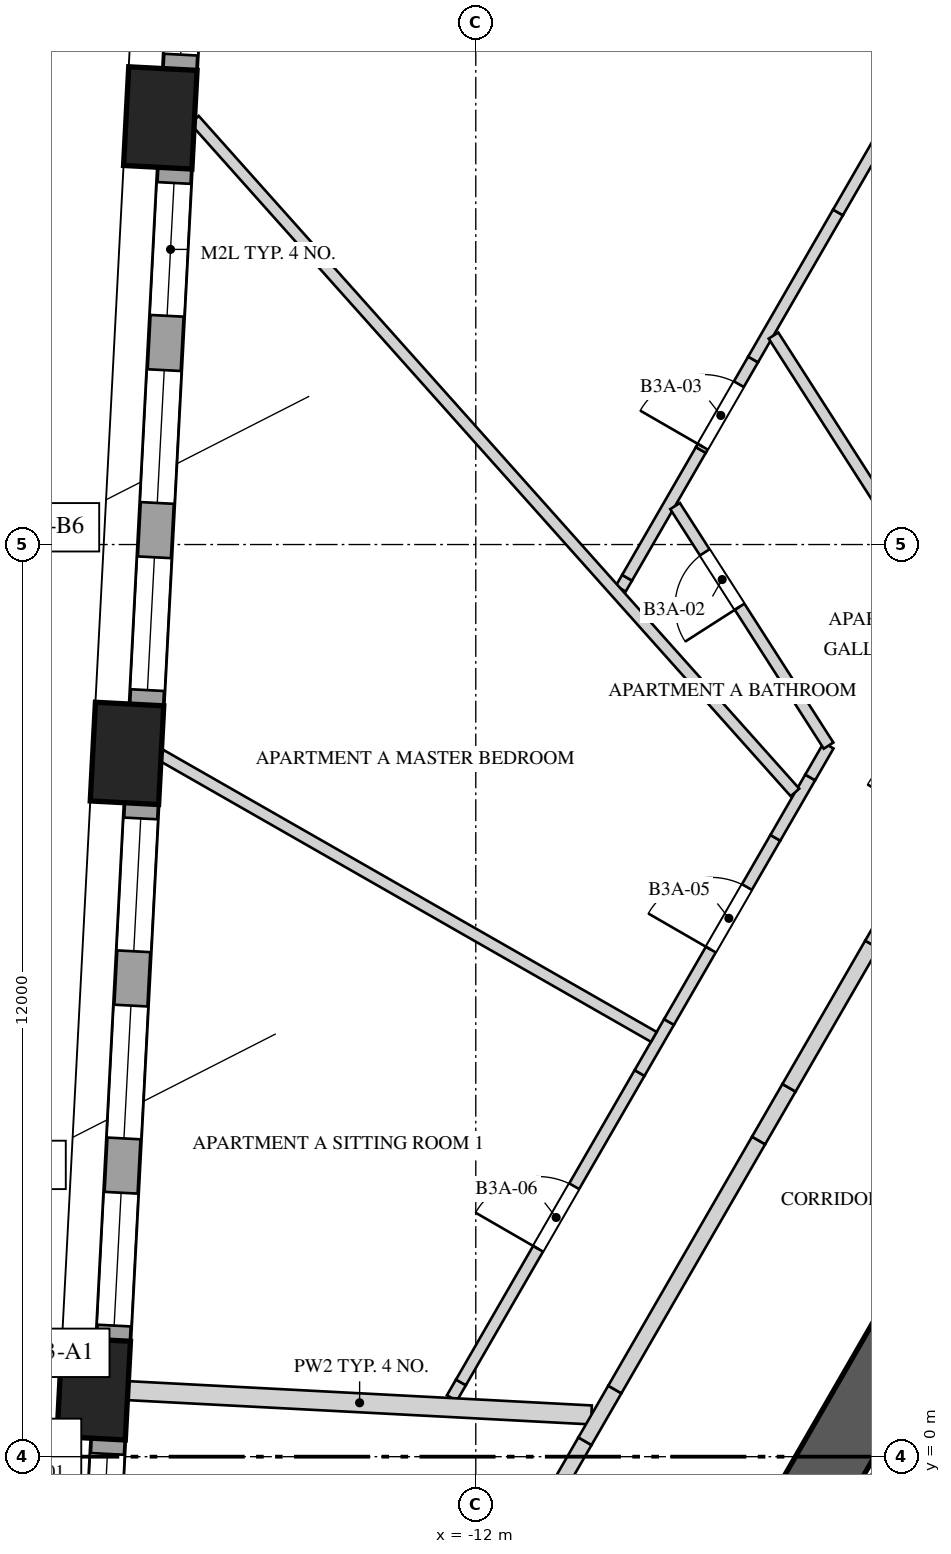
"""IFC4 building model, lengths in metres.
Left out: names, types, materials, properties, quantities, classifications, styles, units other than length and angle.
Written with IfcOpenShell. Run it as: python <this file> out.ifc"""

import sys

from ifc_helpers import new_model, si_unit, direction, frame, frame_2d, origin, origin_2d, place, context, subcontext, project, spatial, polyline, rectangle, outline, extrude, element, fill, save


model = new_model("IFC4")
c1 = context("Model", 3, precision=1e-05, world=origin(), true_north=direction((0.0, 1.0)))
c2 = subcontext(c1, "Body", "Model", "MODEL_VIEW")
j1 = project(units=[si_unit("LENGTHUNIT", "METRE"), si_unit("PLANEANGLEUNIT", "RADIAN")], contexts=[c1])
p1 = place(None, origin())
s1 = spatial("IfcSite", under=j1, at=p1, CompositionType="ELEMENT")
p2 = place(p1, origin())
s2 = spatial("IfcBuilding", under=s1, at=p2, CompositionType="ELEMENT")
p3 = place(p2, frame((0.0, 0.0, 133.6)))
s3 = spatial("IfcBuildingStorey", under=s2, at=p3, CompositionType="ELEMENT", Elevation=133.6)
p4 = place(p3, frame((-1.184, 10.55, 0.0), z_axis=(0.0, 0.0, 1.0), x_axis=(-0.500004814304, -0.866022624227, 0.0)))
e1 = element("IfcWall", 1, at=p4, inside=s3, PredefinedType="SHEAR", context=c2, shape_type="SweptSolid", body=[
    extrude(rectangle(XDim=17.09, YDim=0.9, at=frame_2d((8.545, 0.0))), origin(), (0.0, 0.0, 1.0), 4.0),
])
p5 = place(p4, frame((6.75, 0.0, 0.0)))
e2 = element("IfcOpeningElement", 2, at=p5, cuts=e1, PredefinedType="OPENING", context=c2, shape_type="SweptSolid", body=[
    extrude(rectangle(XDim=1.0, YDim=2.4, at=frame_2d((0.5, 1.2))), frame((0.0, 0.46, 0.0), z_axis=(0.0, -1.0, 0.0), x_axis=(1.0, 0.0, 0.0)), (0.0, 0.0, 1.0), 0.92),
])
p6 = place(p4, frame((14.678, 0.0, 0.0)))
e3 = element("IfcOpeningElement", 3, at=p6, cuts=e1, PredefinedType="OPENING", context=c2, shape_type="SweptSolid", body=[
    extrude(rectangle(XDim=0.8, YDim=2.1, at=frame_2d((0.4, 1.05))), frame((0.0, 0.46, 0.0), z_axis=(0.0, -1.0, 0.0), x_axis=(1.0, 0.0, 0.0)), (0.0, 0.0, 1.0), 0.92),
])
for number, where, z_axis, x_axis in (
    (4, (-16.15, 17.613, 0.0), (0.0, 0.0, 1.0), (-0.052, -0.999, 0.0)),
    (5, (-16.588, 9.252, 0.0), (0.0, 0.0, 1.0), (-0.052, -0.999, 0.0)),
    (6, (-17.027, 0.892, 0.0), (0.0, 0.0, 1.0), (-0.052, -0.999, 0.0)),
):
    element("IfcColumn", number, at=place(p3, frame(where, z_axis=z_axis, x_axis=x_axis)), inside=s3, PredefinedType="COLUMN", context=c2, shape_type="SweptSolid", body=[
        extrude(rectangle(XDim=1.3, YDim=0.9, at=origin_2d()), origin(), (0.0, 0.0, 1.0), 4.0),
    ])
p7 = place(p3, frame((-15.556, 24.663, 0.0), z_axis=(0.0, 0.0, 1.0), x_axis=(-0.052313391961, -0.998630717043, 0.0)))
e7 = element("IfcWall", 7, at=p7, inside=s3, PredefinedType="SOLIDWALL", context=c2, shape_type="SweptSolid", body=[
    extrude(rectangle(XDim=6.422, YDim=0.45, at=frame_2d((3.211, 0.0))), origin(), (0.0, 0.0, 1.0), 3.3),
])
p8 = place(p7, frame((0.195, 0.0, 0.5)))
e8 = element("IfcOpeningElement", 8, at=p8, cuts=e7, PredefinedType="OPENING", context=c2, shape_type="SweptSolid", body=[
    extrude(rectangle(XDim=1.1, YDim=2.0, at=frame_2d((0.55, 1.0))), frame((0.0, 0.235, 0.0), z_axis=(0.0, -1.0, 0.0), x_axis=(1.0, 0.0, 0.0)), (0.0, 0.0, 1.0), 0.47),
])
p9 = place(p7, frame((2.011, 0.0, 0.5)))
e9 = element("IfcOpeningElement", 9, at=p9, cuts=e7, PredefinedType="OPENING", context=c2, shape_type="SweptSolid", body=[
    extrude(rectangle(XDim=1.75, YDim=2.65, at=frame_2d((0.875, 1.325))), frame((0.0, 0.235, 0.0), z_axis=(0.0, -1.0, 0.0), x_axis=(1.0, 0.0, 0.0)), (0.0, 0.0, 1.0), 0.47),
])
p10 = place(p7, frame((4.476, 0.0, 0.5)))
e10 = element("IfcOpeningElement", 10, at=p10, cuts=e7, PredefinedType="OPENING", context=c2, shape_type="SweptSolid", body=[
    extrude(rectangle(XDim=1.75, YDim=2.65, at=frame_2d((0.875, 1.325))), frame((0.0, 0.235, 0.0), z_axis=(0.0, -1.0, 0.0), x_axis=(1.0, 0.0, 0.0)), (0.0, 0.0, 1.0), 0.47),
])
p11 = place(p3, frame((-15.96, 16.952, 0.0), z_axis=(0.0, 0.0, 1.0), x_axis=(-0.052337766399, -0.998629439887, 0.0)))
e11 = element("IfcWall", 11, at=p11, inside=s3, PredefinedType="SOLIDWALL", context=c2, shape_type="SweptSolid", body=[
    extrude(rectangle(XDim=7.072, YDim=0.45, at=frame_2d((3.536, 0.0))), origin(), (0.0, 0.0, 1.0), 3.3),
])
p12 = place(p11, frame((0.195, 0.0, 0.5)))
e12 = element("IfcOpeningElement", 12, at=p12, cuts=e11, PredefinedType="OPENING", context=c2, shape_type="SweptSolid", body=[
    extrude(rectangle(XDim=1.75, YDim=2.0, at=frame_2d((0.875, 1.0))), frame((0.0, 0.235, 0.0), z_axis=(0.0, -1.0, 0.0), x_axis=(1.0, 0.0, 0.0)), (0.0, 0.0, 1.0), 0.47),
])
p13 = place(p11, frame((2.661, 0.0, 0.5)))
e13 = element("IfcOpeningElement", 13, at=p13, cuts=e11, PredefinedType="OPENING", context=c2, shape_type="SweptSolid", body=[
    extrude(rectangle(XDim=1.75, YDim=2.65, at=frame_2d((0.875, 1.325))), frame((0.0, 0.235, 0.0), z_axis=(0.0, -1.0, 0.0), x_axis=(1.0, 0.0, 0.0)), (0.0, 0.0, 1.0), 0.47),
])
p14 = place(p11, frame((5.126, 0.0, 0.5)))
e14 = element("IfcOpeningElement", 14, at=p14, cuts=e11, PredefinedType="OPENING", context=c2, shape_type="SweptSolid", body=[
    extrude(rectangle(XDim=1.75, YDim=2.65, at=frame_2d((0.875, 1.325))), frame((0.0, 0.235, 0.0), z_axis=(0.0, -1.0, 0.0), x_axis=(1.0, 0.0, 0.0)), (0.0, 0.0, 1.0), 0.47),
])
p15 = place(p3, frame((-16.398, 8.592, 0.0), z_axis=(0.0, 0.0, 1.0), x_axis=(-0.052337766399, -0.998629439887, 0.0)))
e15 = element("IfcWall", 15, at=p15, inside=s3, PredefinedType="SOLIDWALL", context=c2, shape_type="SweptSolid", body=[
    extrude(rectangle(XDim=7.072, YDim=0.45, at=frame_2d((3.536, 0.0))), origin(), (0.0, 0.0, 1.0), 3.3),
])
p16 = place(p15, frame((0.195, 0.0, 0.5)))
e16 = element("IfcOpeningElement", 16, at=p16, cuts=e15, PredefinedType="OPENING", context=c2, shape_type="SweptSolid", body=[
    extrude(rectangle(XDim=1.75, YDim=2.65, at=frame_2d((0.875, 1.325))), frame((0.0, 0.235, 0.0), z_axis=(0.0, -1.0, 0.0), x_axis=(1.0, 0.0, 0.0)), (0.0, 0.0, 1.0), 0.47),
])
p17 = place(p15, frame((2.661, 0.0, 0.5)))
e17 = element("IfcOpeningElement", 17, at=p17, cuts=e15, PredefinedType="OPENING", context=c2, shape_type="SweptSolid", body=[
    extrude(rectangle(XDim=1.75, YDim=2.65, at=frame_2d((0.875, 1.325))), frame((0.0, 0.235, 0.0), z_axis=(0.0, -1.0, 0.0), x_axis=(1.0, 0.0, 0.0)), (0.0, 0.0, 1.0), 0.47),
])
p18 = place(p15, frame((5.126, 0.0, 0.5)))
e18 = element("IfcOpeningElement", 18, at=p18, cuts=e15, PredefinedType="OPENING", context=c2, shape_type="SweptSolid", body=[
    extrude(rectangle(XDim=1.75, YDim=2.65, at=frame_2d((0.875, 1.325))), frame((0.0, 0.235, 0.0), z_axis=(0.0, -1.0, 0.0), x_axis=(1.0, 0.0, 0.0)), (0.0, 0.0, 1.0), 0.47),
])
p19 = place(p3, frame((-16.836, 0.231, 0.0), z_axis=(0.0, 0.0, 1.0), x_axis=(-0.05234931875, -0.998628834366, 0.0)))
e19 = element("IfcWall", 19, at=p19, inside=s3, PredefinedType="SOLIDWALL", context=c2, shape_type="SweptSolid", body=[
    extrude(rectangle(XDim=2.141, YDim=0.45, at=frame_2d((1.07, 0.0))), origin(), (0.0, 0.0, 1.0), 3.3),
])
p20 = place(p19, frame((0.195, 0.0, 0.5)))
e20 = element("IfcOpeningElement", 20, at=p20, cuts=e19, PredefinedType="OPENING", context=c2, shape_type="SweptSolid", body=[
    extrude(rectangle(XDim=1.75, YDim=2.65, at=frame_2d((0.875, 1.325))), frame((0.0, 0.235, 0.0), z_axis=(0.0, -1.0, 0.0), x_axis=(1.0, 0.0, 0.0)), (0.0, 0.0, 1.0), 0.47),
])
p21 = place(p3, frame((-4.451, 3.39, 0.0), z_axis=(0.0, 0.0, 1.0), x_axis=(-0.499996545922, -0.866027397988, 0.0)))
e21 = element("IfcWall", 21, at=p21, inside=s3, PredefinedType="SOLIDWALL", context=c2, shape_type="SweptSolid", body=[
    extrude(rectangle(XDim=5.5, YDim=0.4, at=frame_2d((2.75, 0.0))), origin(), (0.0, 0.0, 1.0), 3.65),
])
p22 = place(p3, frame((-12.314, 0.771, 0.0), z_axis=(0.0, 0.0, 1.0), x_axis=(0.4996633593, 0.866219676164, 0.0)))
e22 = element("IfcWall", 22, at=p22, inside=s3, PredefinedType="PARTITIONING", context=c2, shape_type="SweptSolid", body=[
    extrude(rectangle(XDim=0.239, YDim=0.15, at=frame_2d((0.119, 0.0))), origin(), (0.0, 0.0, 1.0), 2.95),
])
p23 = place(p3, frame((-12.195, 0.977, 0.0), z_axis=(0.0, 0.0, 1.0), x_axis=(0.499993726502, 0.86602902576, 0.0)))
e23 = element("IfcWall", 23, at=p23, inside=s3, PredefinedType="PARTITIONING", context=c2, shape_type="SweptSolid", body=[
    extrude(rectangle(XDim=4.7, YDim=0.15, at=frame_2d((2.35, 0.0))), origin(), (0.0, 0.0, 1.0), 3.65),
])
p24 = place(p23, frame((2.03, 0.0, 0.0)))
e24 = element("IfcOpeningElement", 24, at=p24, cuts=e23, PredefinedType="OPENING", context=c2, shape_type="SweptSolid", body=[
    extrude(rectangle(XDim=0.95, YDim=2.4, at=frame_2d((0.475, 1.2))), frame((0.0, 0.085, 0.0), z_axis=(0.0, -1.0, 0.0), x_axis=(1.0, 0.0, 0.0)), (0.0, 0.0, 1.0), 0.17),
])
p25 = place(p3, frame((-9.845, 5.048, 0.0), z_axis=(0.0, 0.0, 1.0), x_axis=(0.499967891604, 0.866043940782, 0.0)))
e25 = element("IfcWall", 25, at=p25, inside=s3, PredefinedType="PARTITIONING", context=c2, shape_type="SweptSolid", body=[
    extrude(rectangle(XDim=0.775, YDim=0.15, at=frame_2d((0.387, 0.0))), origin(), (0.0, 0.0, 1.0), 2.75),
])
p26 = place(p3, frame((-9.458, 5.719, 0.0), z_axis=(0.0, 0.0, 1.0), x_axis=(0.499996941814, 0.866027169422, 0.0)))
e26 = element("IfcWall", 26, at=p26, inside=s3, PredefinedType="PARTITIONING", context=c2, shape_type="SweptSolid", body=[
    extrude(rectangle(XDim=2.797, YDim=0.15, at=frame_2d((1.399, 0.0))), origin(), (0.0, 0.0, 1.0), 3.65),
])
p27 = place(p26, frame((1.1, 0.0, 0.0)))
e27 = element("IfcOpeningElement", 27, at=p27, cuts=e26, PredefinedType="OPENING", context=c2, shape_type="SweptSolid", body=[
    extrude(rectangle(XDim=0.95, YDim=2.4, at=frame_2d((0.475, 1.2))), frame((0.0, 0.085, 0.0), z_axis=(0.0, -1.0, 0.0), x_axis=(1.0, 0.0, 0.0)), (0.0, 0.0, 1.0), 0.17),
])
p28 = place(p3, frame((-8.059, 8.141, 0.0), z_axis=(0.0, 0.0, 1.0), x_axis=(0.500060322201, 0.865990573944, 0.0)))
e28 = element("IfcWall", 28, at=p28, inside=s3, PredefinedType="PARTITIONING", context=c2, shape_type="SweptSolid", body=[
    extrude(rectangle(XDim=0.917, YDim=0.15, at=frame_2d((0.459, 0.0))), origin(), (0.0, 0.0, 1.0), 2.55),
])
p29 = place(p3, frame((-7.6, 8.936, 0.0), z_axis=(0.0, 0.0, 1.0), x_axis=(0.499941024108, 0.866059450854, 0.0)))
e29 = element("IfcWall", 29, at=p29, inside=s3, PredefinedType="PARTITIONING", context=c2, shape_type="SweptSolid", body=[
    extrude(rectangle(XDim=0.483, YDim=0.15, at=frame_2d((0.242, 0.0))), origin(), (0.0, 0.0, 1.0), 3.65),
])
p30 = place(p3, frame((-10.479, 0.549, 0.0), z_axis=(0.0, 0.0, 1.0), x_axis=(-0.998629511984, 0.052336390727, 0.0)))
e30 = element("IfcWall", 30, at=p30, inside=s3, PredefinedType="SOLIDWALL", context=c2, shape_type="SweptSolid", body=[
    extrude(rectangle(XDim=6.106, YDim=0.25, at=frame_2d((3.053, 0.0))), origin(), (0.0, 0.0, 1.0), 2.95),
])
p31 = place(p3, frame((-10.093, 11.419, 0.0), z_axis=(0.0, 0.0, 1.0), x_axis=(0.500399834964, 0.865794435861, 0.0)))
e31 = element("IfcWall", 31, at=p31, inside=s3, PredefinedType="PARTITIONING", context=c2, shape_type="SweptSolid", body=[
    extrude(rectangle(XDim=0.166, YDim=0.15, at=frame_2d((0.083, 0.0))), origin(), (0.0, 0.0, 1.0), 2.55),
])
p32 = place(p3, frame((-10.01, 11.563, 0.0), z_axis=(0.0, 0.0, 1.0), x_axis=(0.499994660107, 0.866028486751, 0.0)))
e32 = element("IfcWall", 32, at=p32, inside=s3, PredefinedType="PARTITIONING", context=c2, shape_type="SweptSolid", body=[
    extrude(rectangle(XDim=1.941, YDim=0.15, at=frame_2d((0.97, 0.0))), origin(), (0.0, 0.0, 1.0), 3.65),
])
p33 = place(p3, frame((-9.039, 13.244, 0.0), z_axis=(0.0, 0.0, 1.0), x_axis=(0.499978698016, 0.866037702141, 0.0)))
e33 = element("IfcWall", 33, at=p33, inside=s3, PredefinedType="PARTITIONING", context=c2, shape_type="SweptSolid", body=[
    extrude(outline(polyline([(0.0, 0.0), (1.375, 0.0), (1.375, 2.55), (0.38, 2.55), (0.38, 3.65), (0.0, 3.65), (0.0, 0.0)])), frame((0.0, 0.075, 0.0), z_axis=(0.0, -1.0, 0.0), x_axis=(1.0, 0.0, 0.0)), (0.0, 0.0, 1.0), 0.15),
])
p34 = place(p33, frame((0.05, 0.0, 0.0)))
e34 = element("IfcOpeningElement", 34, at=p34, cuts=e33, PredefinedType="OPENING", context=c2, shape_type="SweptSolid", body=[
    extrude(rectangle(XDim=0.95, YDim=2.4, at=frame_2d((0.475, 1.2))), frame((0.0, 0.085, 0.0), z_axis=(0.0, -1.0, 0.0), x_axis=(1.0, 0.0, 0.0)), (0.0, 0.0, 1.0), 0.17),
])
p35 = place(p3, frame((-8.352, 14.434, 0.0), z_axis=(0.0, 0.0, 1.0), x_axis=(0.500040905051, 0.866001785954, 0.0)))
e35 = element("IfcWall", 35, at=p35, inside=s3, PredefinedType="PARTITIONING", context=c2, shape_type="SweptSolid", body=[
    extrude(rectangle(XDim=2.234, YDim=0.15, at=frame_2d((1.117, 0.0))), origin(), (0.0, 0.0, 1.0), 3.65),
])
p36 = place(p3, frame((-7.235, 16.369, 0.0), z_axis=(0.0, 0.0, 1.0), x_axis=(0.499850094852, 0.866111934265, 0.0)))
e36 = element("IfcWall", 36, at=p36, inside=s3, PredefinedType="PARTITIONING", context=c2, shape_type="SweptSolid", body=[
    extrude(rectangle(XDim=1.104, YDim=0.15, at=frame_2d((0.552, 0.0))), origin(), (0.0, 0.0, 1.0), 2.55),
])
p37 = place(p3, frame((-9.658, 5.522, 0.0), z_axis=(0.0, 0.0, 1.0), x_axis=(-0.868078092768, 0.496427663267, 0.0)))
e37 = element("IfcWall", 37, at=p37, inside=s3, PredefinedType="PARTITIONING", context=c2, shape_type="SweptSolid", body=[
    extrude(rectangle(XDim=7.467, YDim=0.15, at=frame_2d((3.733, 0.0))), origin(), (0.0, 0.0, 1.0), 2.75),
])
p38 = place(p3, frame((-8.083, 14.749, 0.0), z_axis=(0.0, 0.0, 1.0), x_axis=(0.539468172068, -0.842005992452, 0.0)))
e38 = element("IfcWall", 38, at=p38, inside=s3, PredefinedType="PARTITIONING", context=c2, shape_type="SweptSolid", body=[
    extrude(rectangle(XDim=3.744, YDim=0.15, at=frame_2d((1.872, 0.0))), origin(), (0.0, 0.0, 1.0), 3.65),
])
p39 = place(p3, frame((-7.801, 8.739, 0.0), z_axis=(0.0, 0.0, 1.0), x_axis=(-0.665934790779, 0.746009955986, 0.0)))
e39 = element("IfcWall", 39, at=p39, inside=s3, PredefinedType="PARTITIONING", context=c2, shape_type="SweptSolid", body=[
    extrude(rectangle(XDim=11.863, YDim=0.15, at=frame_2d((5.932, 0.0))), origin(), (0.0, 0.0, 1.0), 2.55),
])
p40 = place(p3, frame((-7.359, 9.354, 0.0), z_axis=(0.0, 0.0, 1.0), x_axis=(-0.539468172068, 0.842005992452, 0.0)))
e40 = element("IfcWall", 40, at=p40, inside=s3, PredefinedType="PARTITIONING", context=c2, shape_type="SweptSolid", body=[
    extrude(rectangle(XDim=3.744, YDim=0.15, at=frame_2d((1.872, 0.0))), origin(), (0.0, 0.0, 1.0), 3.65),
])
p41 = place(p40, frame((2.17, 0.0, 0.0)))
e41 = element("IfcOpeningElement", 41, at=p41, cuts=e40, PredefinedType="OPENING", context=c2, shape_type="SweptSolid", body=[
    extrude(rectangle(XDim=0.85, YDim=2.4, at=frame_2d((0.425, 1.2))), frame((0.0, 0.085, 0.0), z_axis=(0.0, -1.0, 0.0), x_axis=(1.0, 0.0, 0.0)), (0.0, 0.0, 1.0), 0.17),
])
p42 = place(p3, frame((-13.135, -4.25, 0.0), z_axis=(0.0, 0.0, 1.0), x_axis=(0.50000466804, 0.866022708674, 0.0)))
e42 = element("IfcWall", 42, at=p42, inside=s3, PredefinedType="SOLIDWALL", context=c2, shape_type="SweptSolid", body=[
    extrude(rectangle(XDim=5.142, YDim=0.2, at=frame_2d((2.571, 0.0))), origin(), (0.0, 0.0, 1.0), 3.65),
])
p43 = place(p3, frame((-10.564, 0.203, 0.0), z_axis=(0.0, 0.0, 1.0), x_axis=(0.499982474044, 0.866035522163, 0.0)))
e43 = element("IfcWall", 43, at=p43, inside=s3, PredefinedType="SOLIDWALL", context=c2, shape_type="SweptSolid", body=[
    extrude(rectangle(XDim=0.786, YDim=0.2, at=frame_2d((0.393, 0.0))), origin(), (0.0, 0.0, 1.0), 2.95),
])
p44 = place(p3, frame((-10.171, 0.884, 0.0), z_axis=(0.0, 0.0, 1.0), x_axis=(0.499998034377, 0.866026538634, 0.0)))
e44 = element("IfcWall", 44, at=p44, inside=s3, PredefinedType="SOLIDWALL", context=c2, shape_type="SweptSolid", body=[
    extrude(rectangle(XDim=3.783, YDim=0.2, at=frame_2d((1.892, 0.0))), origin(), (0.0, 0.0, 1.0), 3.65),
])
p45 = place(p3, frame((-8.279, 4.16, 0.0), z_axis=(0.0, 0.0, 1.0), x_axis=(0.500109828528, 0.865961984968, 0.0)))
e45 = element("IfcWall", 45, at=p45, inside=s3, PredefinedType="SOLIDWALL", context=c2, shape_type="SweptSolid", body=[
    extrude(rectangle(XDim=0.8, YDim=0.2, at=frame_2d((0.4, 0.0))), origin(), (0.0, 0.0, 1.0), 2.75),
])
p46 = place(p3, frame((-7.879, 4.853, 0.0), z_axis=(0.0, 0.0, 1.0), x_axis=(0.499948868167, 0.866054922749, 0.0)))
e46 = element("IfcWall", 46, at=p46, inside=s3, PredefinedType="SOLIDWALL", context=c2, shape_type="SweptSolid", body=[
    extrude(rectangle(XDim=2.178, YDim=0.2, at=frame_2d((1.089, 0.0))), origin(), (0.0, 0.0, 1.0), 3.65),
])
p47 = place(p3, frame((-6.79, 6.739, 0.0), z_axis=(0.0, 0.0, 1.0), x_axis=(0.500118100521, 0.865957207679, 0.0)))
e47 = element("IfcWall", 47, at=p47, inside=s3, PredefinedType="SOLIDWALL", context=c2, shape_type="SweptSolid", body=[
    extrude(rectangle(XDim=0.944, YDim=0.2, at=frame_2d((0.472, 0.0))), origin(), (0.0, 0.0, 1.0), 2.55),
])
p48 = place(p10, origin())
e48 = element("IfcWindow", 48, at=p48, inside=s3, PartitioningType="SINGLE_PANEL", PredefinedType="WINDOW", context=c2, shape_type="SweptSolid", body=[
    extrude(rectangle(XDim=1.75, YDim=2.65, at=frame_2d((0.875, 1.325))), frame((0.0, 0.03, 0.0), z_axis=(0.0, -1.0, 0.0), x_axis=(1.0, 0.0, 0.0)), (0.0, 0.0, 1.0), 0.06),
])
fill(e10, e48)
p49 = place(p12, origin())
e49 = element("IfcWindow", 49, at=p49, inside=s3, PartitioningType="SINGLE_PANEL", PredefinedType="WINDOW", context=c2, shape_type="SweptSolid", body=[
    extrude(rectangle(XDim=1.75, YDim=2.0, at=frame_2d((0.875, 1.0))), frame((0.0, 0.03, 0.0), z_axis=(0.0, -1.0, 0.0), x_axis=(1.0, 0.0, 0.0)), (0.0, 0.0, 1.0), 0.06),
])
fill(e12, e49)
p50 = place(p13, origin())
e50 = element("IfcWindow", 50, at=p50, inside=s3, PartitioningType="SINGLE_PANEL", PredefinedType="WINDOW", context=c2, shape_type="SweptSolid", body=[
    extrude(rectangle(XDim=1.75, YDim=2.65, at=frame_2d((0.875, 1.325))), frame((0.0, 0.03, 0.0), z_axis=(0.0, -1.0, 0.0), x_axis=(1.0, 0.0, 0.0)), (0.0, 0.0, 1.0), 0.06),
])
fill(e13, e50)
p51 = place(p14, origin())
e51 = element("IfcWindow", 51, at=p51, inside=s3, PartitioningType="SINGLE_PANEL", PredefinedType="WINDOW", context=c2, shape_type="SweptSolid", body=[
    extrude(rectangle(XDim=1.75, YDim=2.65, at=frame_2d((0.875, 1.325))), frame((0.0, 0.03, 0.0), z_axis=(0.0, -1.0, 0.0), x_axis=(1.0, 0.0, 0.0)), (0.0, 0.0, 1.0), 0.06),
])
fill(e14, e51)
p52 = place(p16, origin())
e52 = element("IfcWindow", 52, at=p52, inside=s3, PartitioningType="SINGLE_PANEL", PredefinedType="WINDOW", context=c2, shape_type="SweptSolid", body=[
    extrude(rectangle(XDim=1.75, YDim=2.65, at=frame_2d((0.875, 1.325))), frame((0.0, 0.03, 0.0), z_axis=(0.0, -1.0, 0.0), x_axis=(1.0, 0.0, 0.0)), (0.0, 0.0, 1.0), 0.06),
])
fill(e16, e52)
p53 = place(p17, origin())
e53 = element("IfcWindow", 53, at=p53, inside=s3, PartitioningType="SINGLE_PANEL", PredefinedType="WINDOW", context=c2, shape_type="SweptSolid", body=[
    extrude(rectangle(XDim=1.75, YDim=2.65, at=frame_2d((0.875, 1.325))), frame((0.0, 0.03, 0.0), z_axis=(0.0, -1.0, 0.0), x_axis=(1.0, 0.0, 0.0)), (0.0, 0.0, 1.0), 0.06),
])
fill(e17, e53)
p54 = place(p18, origin())
e54 = element("IfcWindow", 54, at=p54, inside=s3, PartitioningType="SINGLE_PANEL", PredefinedType="WINDOW", context=c2, shape_type="SweptSolid", body=[
    extrude(rectangle(XDim=1.75, YDim=2.65, at=frame_2d((0.875, 1.325))), frame((0.0, 0.03, 0.0), z_axis=(0.0, -1.0, 0.0), x_axis=(1.0, 0.0, 0.0)), (0.0, 0.0, 1.0), 0.06),
])
fill(e18, e54)
p55 = place(p20, origin())
e55 = element("IfcWindow", 55, at=p55, inside=s3, PartitioningType="SINGLE_PANEL", PredefinedType="WINDOW", context=c2, shape_type="SweptSolid", body=[
    extrude(rectangle(XDim=1.75, YDim=2.65, at=frame_2d((0.875, 1.325))), frame((0.0, 0.03, 0.0), z_axis=(0.0, -1.0, 0.0), x_axis=(1.0, 0.0, 0.0)), (0.0, 0.0, 1.0), 0.06),
])
fill(e20, e55)
p56 = place(p41, origin())
e56 = element("IfcDoor", 56, at=p56, inside=s3, OperationType="SINGLE_SWING_RIGHT", PredefinedType="DOOR", context=c2, shape_type="SweptSolid", body=[
    extrude(rectangle(XDim=0.85, YDim=2.4, at=frame_2d((0.425, 1.2))), frame((0.0, 0.025, 0.0), z_axis=(0.0, -1.0, 0.0), x_axis=(1.0, 0.0, 0.0)), (0.0, 0.0, 1.0), 0.05),
])
fill(e41, e56)
p57 = place(p34, origin())
e57 = element("IfcDoor", 57, at=p57, inside=s3, OperationType="SINGLE_SWING_LEFT", PredefinedType="DOOR", context=c2, shape_type="SweptSolid", body=[
    extrude(rectangle(XDim=0.95, YDim=2.4, at=frame_2d((0.475, 1.2))), frame((0.0, 0.025, 0.0), z_axis=(0.0, -1.0, 0.0), x_axis=(1.0, 0.0, 0.0)), (0.0, 0.0, 1.0), 0.05),
])
fill(e34, e57)
p58 = place(p27, origin())
e58 = element("IfcDoor", 58, at=p58, inside=s3, OperationType="SINGLE_SWING_LEFT", PredefinedType="DOOR", context=c2, shape_type="SweptSolid", body=[
    extrude(rectangle(XDim=0.95, YDim=2.4, at=frame_2d((0.475, 1.2))), frame((0.0, 0.025, 0.0), z_axis=(0.0, -1.0, 0.0), x_axis=(1.0, 0.0, 0.0)), (0.0, 0.0, 1.0), 0.05),
])
fill(e27, e58)
p59 = place(p24, origin())
e59 = element("IfcDoor", 59, at=p59, inside=s3, OperationType="SINGLE_SWING_RIGHT", PredefinedType="DOOR", context=c2, shape_type="SweptSolid", body=[
    extrude(rectangle(XDim=0.95, YDim=2.4, at=frame_2d((0.475, 1.2))), frame((0.0, 0.025, 0.0), z_axis=(0.0, -1.0, 0.0), x_axis=(1.0, 0.0, 0.0)), (0.0, 0.0, 1.0), 0.05),
])
fill(e24, e59)
save(model, sys.argv[1])
